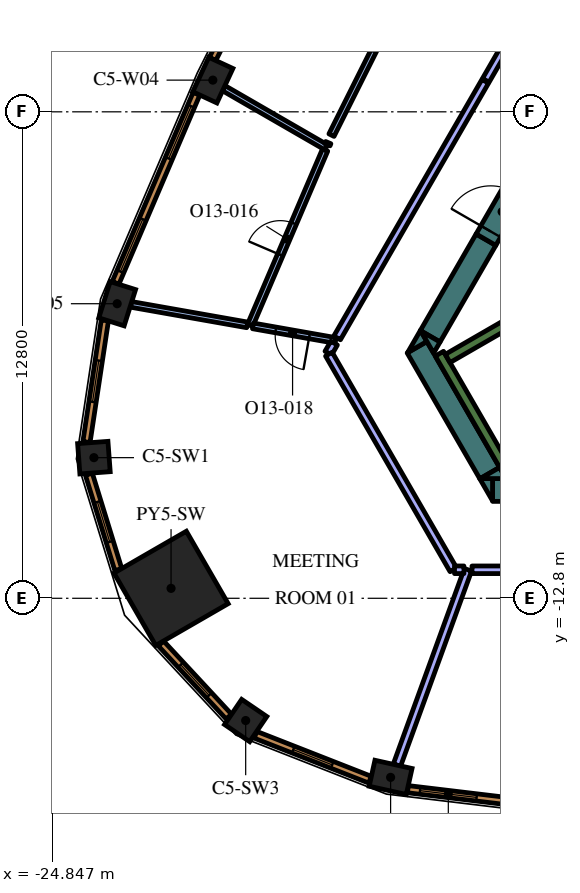
"""IFC4 building model, lengths in metres.
Left out: names, types, materials, properties, quantities, classifications, styles, units other than length and angle.
Written with IfcOpenShell. Run it as: python <this file> out.ifc"""

import sys

from ifc_helpers import new_model, si_unit, direction, frame, frame_2d, origin, origin_2d, place, context, subcontext, project, spatial, polyline, rectangle, outline, extrude, element, fill, save


model = new_model("IFC4")
c1 = context("Model", 3, precision=1e-05, world=origin(), true_north=direction((0.0, 1.0)))
c2 = subcontext(c1, "Body", "Model", "MODEL_VIEW")
j1 = project(units=[si_unit("LENGTHUNIT", "METRE"), si_unit("PLANEANGLEUNIT", "RADIAN")], contexts=[c1])
p1 = place(None, origin())
s1 = spatial("IfcSite", under=j1, at=p1, CompositionType="ELEMENT")
p2 = place(p1, origin())
s2 = spatial("IfcBuilding", under=s1, at=p2, CompositionType="ELEMENT")
p3 = place(p2, frame((0.0, 0.0, 296.4)))
s3 = spatial("IfcBuildingStorey", under=s2, at=p3, CompositionType="ELEMENT", Elevation=296.4)
p4 = place(p3, frame((-21.718, -12.539, 0.0), z_axis=(0.0, 0.0, 1.0), x_axis=(-0.866025403784, -0.5, 0.0)))
e1 = element("IfcColumn", 1, at=p4, inside=s3, PredefinedType="COLUMN", context=c2, shape_type="SweptSolid", body=[
    extrude(rectangle(XDim=2.2, YDim=2.2, at=origin_2d()), origin(), (0.0, 0.0, 1.0), 4.2),
])
for number, where, z_axis, x_axis in (
    (2, (-15.941, -17.512, 0.0), (0.0, 0.0, 1.0), (0.976, -0.217, 0.0)),
    (3, (-20.619, 0.834, 0.0), (0.0, 0.0, 1.0), (-0.421, -0.907, 0.0)),
    (4, (-23.136, -5.049, 0.0), (0.0, 0.0, 1.0), (-0.3, -0.954, 0.0)),
):
    element("IfcColumn", number, at=place(p3, frame(where, z_axis=z_axis, x_axis=x_axis)), inside=s3, PredefinedType="COLUMN", context=c2, shape_type="SweptSolid", body=[
        extrude(rectangle(XDim=1.0, YDim=0.7, at=origin_2d()), origin(), (0.0, 0.0, 1.0), 4.2),
    ])
for number, where, z_axis, x_axis in (
    (5, (-23.748, -9.1, 0.0), (0.0, 0.0, 1.0), (0.075, -0.997, 0.0)),
    (6, (-19.754, -16.017, 0.0), (0.0, 0.0, 1.0), (0.826, -0.563, 0.0)),
):
    element("IfcColumn", number, at=place(p3, frame(where, z_axis=z_axis, x_axis=x_axis)), inside=s3, PredefinedType="COLUMN", context=c2, shape_type="SweptSolid", body=[
        extrude(rectangle(XDim=0.8, YDim=0.8, at=origin_2d()), origin(), (0.0, 0.0, 1.0), 4.2),
    ])
p5 = place(p3, frame((8.904, -9.95, 0.0), z_axis=(0.0, 0.0, 1.0), x_axis=(-1.0, 0.0, 0.0)))
e7 = element("IfcWall", 7, at=p5, inside=s3, PredefinedType="SOLIDWALL", context=c2, shape_type="SweptSolid", body=[
    extrude(rectangle(XDim=22.161, YDim=0.6, at=frame_2d((11.081, 0.0))), origin(), (0.0, 0.0, 1.0), 4.2),
])
p6 = place(p3, origin())
e8 = element("IfcWall", 8, at=p6, inside=s3, PredefinedType="SOLIDWALL", context=c2, shape_type="SweptSolid", body=[
    extrude(outline(polyline([(-13.597, -9.65), (-13.259, -9.65), (-13.259, -10.236), (-13.597, -9.65)])), origin(), (0.0, 0.0, 1.0), 4.2),
])
p7 = place(p3, frame((-13.333, -9.506, 0.0), z_axis=(0.0, 0.0, 1.0), x_axis=(-0.500019073792, 0.866014391245, 0.0)))
e9 = element("IfcWall", 9, at=p7, inside=s3, PredefinedType="SOLIDWALL", context=c2, shape_type="SweptSolid", body=[
    extrude(rectangle(XDim=3.823, YDim=0.6, at=frame_2d((1.912, 0.0))), origin(), (0.0, 0.0, 1.0), 4.2),
])
e10 = element("IfcWall", 10, at=p6, inside=s3, PredefinedType="SOLIDWALL", context=c2, shape_type="SweptSolid", body=[
    extrude(outline(polyline([(-14.987, -6.043), (-15.493, -6.335), (-15.156, -5.75), (-14.987, -6.043)])), origin(), (0.0, 0.0, 1.0), 4.2),
])
e11 = element("IfcWall", 11, at=p6, inside=s3, PredefinedType="SOLIDWALL", context=c2, shape_type="SweptSolid", body=[
    extrude(outline(polyline([(-12.904, -9.65), (-13.58, -9.65), (-13.073, -9.357), (-12.904, -9.65)])), origin(), (0.0, 0.0, 1.0), 4.2),
])
p8 = place(p3, frame((-13.432, -3.364, 0.0), z_axis=(0.0, 0.0, 1.0), x_axis=(-0.499960127962, -0.866048422692, 0.0)))
e12 = element("IfcWall", 12, at=p8, inside=s3, PredefinedType="SOLIDWALL", context=c2, shape_type="SweptSolid", body=[
    extrude(rectangle(XDim=2.934, YDim=0.6, at=frame_2d((1.467, 0.0))), origin(), (0.0, 0.0, 1.0), 4.2),
])
e13 = element("IfcWall", 13, at=p6, inside=s3, PredefinedType="SOLIDWALL", context=c2, shape_type="SweptSolid", body=[
    extrude(outline(polyline([(-14.809, -6.35), (-15.147, -5.764), (-14.64, -6.057), (-14.809, -6.35)])), origin(), (0.0, 0.0, 1.0), 4.2),
])
p9 = place(p3, frame((-12.84, -9.511, 0.0), z_axis=(0.0, 0.0, 1.0), x_axis=(-0.499997733992, 0.866026712061, 0.0)))
e14 = element("IfcWall", 14, at=p9, inside=s3, PredefinedType="SOLIDWALL", context=c2, shape_type="SweptSolid", body=[
    extrude(rectangle(XDim=3.634, YDim=0.25, at=frame_2d((1.817, 0.0))), origin(), (0.0, 0.0, 1.0), 4.2),
])
p10 = place(p3, frame((-14.44, -6.49, 0.0), z_axis=(0.0, 0.0, 1.0), x_axis=(0.866022966069, 0.500004222222, 0.0)))
e15 = element("IfcWall", 15, at=p10, inside=s3, PredefinedType="SOLIDWALL", context=c2, shape_type="SweptSolid", body=[
    extrude(rectangle(XDim=6.8, YDim=0.25, at=frame_2d((3.4, 0.0))), origin(), (0.0, 0.0, 1.0), 4.2),
])
p11 = place(p3, frame((-13.432, -3.364, 0.0), z_axis=(0.0, 0.0, 1.0), x_axis=(0.500062241894, 0.865989465428, 0.0)))
e16 = element("IfcWall", 16, at=p11, inside=s3, PredefinedType="SOLIDWALL", context=c2, shape_type="SweptSolid", body=[
    extrude(rectangle(XDim=1.7, YDim=0.6, at=frame_2d((0.85, 0.0))), origin(), (0.0, 0.0, 1.0), 4.2),
])
p12 = place(p11, frame((0.25, 0.0, 0.0)))
e17 = element("IfcOpeningElement", 17, at=p12, cuts=e16, PredefinedType="OPENING", context=c2, shape_type="SweptSolid", body=[
    extrude(rectangle(XDim=1.2, YDim=2.1, at=frame_2d((0.6, 1.05))), frame((0.0, 0.31, 0.0), z_axis=(0.0, -1.0, 0.0), x_axis=(1.0, 0.0, 0.0)), (0.0, 0.0, 1.0), 0.62),
])
p13 = place(p3, frame((-15.774, -17.19, 0.0), z_axis=(0.0, 0.0, 1.0), x_axis=(0.341821907823, 0.93976474893, 0.0)))
e18 = element("IfcWall", 18, at=p13, inside=s3, PredefinedType="PARTITIONING", context=c2, shape_type="SweptSolid", body=[
    extrude(rectangle(XDim=5.469, YDim=0.2, at=frame_2d((2.735, 0.0))), origin(), (0.0, 0.0, 1.0), 3.55),
])
p14 = place(p3, frame((-13.799, -12.05, 0.0), z_axis=(0.0, 0.0, 1.0), x_axis=(1.0, 0.0, 0.0)))
e19 = element("IfcWall", 19, at=p14, inside=s3, PredefinedType="PARTITIONING", context=c2, shape_type="SweptSolid", body=[
    extrude(rectangle(XDim=7.769, YDim=0.2, at=frame_2d((3.884, 0.0))), origin(), (0.0, 0.0, 1.0), 3.55),
])
p15 = place(p14, frame((3.0, 0.0, 0.0)))
e20 = element("IfcOpeningElement", 20, at=p15, cuts=e19, PredefinedType="OPENING", context=c2, shape_type="SweptSolid", body=[
    extrude(rectangle(XDim=1.8, YDim=2.1, at=frame_2d((0.9, 1.05))), frame((0.0, 0.11, 0.0), z_axis=(0.0, -1.0, 0.0), x_axis=(1.0, 0.0, 0.0)), (0.0, 0.0, 1.0), 0.22),
])
p16 = place(p3, frame((-17.635, -0.936, 0.0), z_axis=(0.0, 0.0, 1.0), x_axis=(-0.866044607523, 0.499966736674, 0.0)))
e21 = element("IfcWall", 21, at=p16, inside=s3, PredefinedType="PARTITIONING", context=c2, shape_type="SweptSolid", body=[
    extrude(rectangle(XDim=3.115, YDim=0.15, at=frame_2d((1.557, 0.0))), origin(), (0.0, 0.0, 1.0), 3.55),
])
p17 = place(p3, frame((-17.497, -0.613, 0.0), z_axis=(0.0, 0.0, 1.0), x_axis=(0.447480081559, 0.89429389834, 0.0)))
e22 = element("IfcWall", 22, at=p17, inside=s3, PredefinedType="PARTITIONING", context=c2, shape_type="SweptSolid", body=[
    extrude(rectangle(XDim=5.863, YDim=0.15, at=frame_2d((2.931, 0.0))), origin(), (0.0, 0.0, 1.0), 3.55),
])
p18 = place(p17, frame((2.463, 0.0, 0.0)))
e23 = element("IfcOpeningElement", 23, at=p18, cuts=e22, PredefinedType="OPENING", context=c2, shape_type="SweptSolid", body=[
    extrude(rectangle(XDim=0.9, YDim=2.1, at=frame_2d((0.45, 1.05))), frame((0.0, 0.085, 0.0), z_axis=(0.0, -1.0, 0.0), x_axis=(1.0, 0.0, 0.0)), (0.0, 0.0, 1.0), 0.17),
])
p19 = place(p3, frame((-17.581, -0.81, 0.0), z_axis=(0.0, 0.0, 1.0), x_axis=(-0.390033474923, -0.92080067791, 0.0)))
e24 = element("IfcWall", 24, at=p19, inside=s3, PredefinedType="PARTITIONING", context=c2, shape_type="SweptSolid", body=[
    extrude(rectangle(XDim=0.061, YDim=0.15, at=frame_2d((0.03, 0.0))), origin(), (0.0, 0.0, 1.0), 3.55),
])
p20 = place(p3, frame((-19.639, -5.62, 0.0), z_axis=(0.0, 0.0, 1.0), x_axis=(0.393349802257, 0.919388891092, 0.0)))
e25 = element("IfcWall", 25, at=p20, inside=s3, PredefinedType="PARTITIONING", context=c2, shape_type="SweptSolid", body=[
    extrude(rectangle(XDim=5.019, YDim=0.15, at=frame_2d((2.51, 0.0))), origin(), (0.0, 0.0, 1.0), 3.55),
])
p21 = place(p20, frame((2.019, 0.0, 0.0)))
e26 = element("IfcOpeningElement", 26, at=p21, cuts=e25, PredefinedType="OPENING", context=c2, shape_type="SweptSolid", body=[
    extrude(rectangle(XDim=0.9, YDim=2.1, at=frame_2d((0.45, 1.05))), frame((0.0, 0.085, 0.0), z_axis=(0.0, -1.0, 0.0), x_axis=(1.0, 0.0, 0.0)), (0.0, 0.0, 1.0), 0.17),
])
p22 = place(p3, frame((-19.714, -5.606, 0.0), z_axis=(0.0, 0.0, 1.0), x_axis=(-0.984768527071, 0.173870492294, 0.0)))
e27 = element("IfcWall", 27, at=p22, inside=s3, PredefinedType="PARTITIONING", context=c2, shape_type="SweptSolid", body=[
    extrude(rectangle(XDim=3.107, YDim=0.15, at=frame_2d((1.554, 0.0))), origin(), (0.0, 0.0, 1.0), 3.55),
])
p23 = place(p3, frame((-17.388, -6.017, 0.0), z_axis=(0.0, 0.0, 1.0), x_axis=(-0.984764633635, 0.173892542513, 0.0)))
e28 = element("IfcWall", 28, at=p23, inside=s3, PredefinedType="PARTITIONING", context=c2, shape_type="SweptSolid", body=[
    extrude(rectangle(XDim=2.208, YDim=0.15, at=frame_2d((1.104, 0.0))), origin(), (0.0, 0.0, 1.0), 3.55),
])
p24 = place(p23, frame((0.7, 0.0, 0.0)))
e29 = element("IfcOpeningElement", 29, at=p24, cuts=e28, PredefinedType="OPENING", context=c2, shape_type="SweptSolid", body=[
    extrude(rectangle(XDim=0.9, YDim=2.1, at=frame_2d((0.45, 1.05))), frame((0.0, 0.085, 0.0), z_axis=(0.0, -1.0, 0.0), x_axis=(1.0, 0.0, 0.0)), (0.0, 0.0, 1.0), 0.17),
])
p25 = place(p3, frame((-7.436, 11.221, 0.0), z_axis=(0.0, 0.0, 1.0), x_axis=(-0.49999894854, -0.866026010844, 0.0)))
e30 = element("IfcWall", 30, at=p25, inside=s3, PredefinedType="PARTITIONING", context=c2, shape_type="SweptSolid", body=[
    extrude(rectangle(XDim=12.0, YDim=0.2, at=frame_2d((6.0, 0.0))), origin(), (0.0, 0.0, 1.0), 3.55),
])
p26 = place(p25, frame((5.5, 0.0, 0.0)))
e31 = element("IfcOpeningElement", 31, at=p26, cuts=e30, PredefinedType="OPENING", context=c2, shape_type="SweptSolid", body=[
    extrude(rectangle(XDim=1.0, YDim=2.1, at=frame_2d((0.5, 1.05))), frame((0.0, 0.11, 0.0), z_axis=(0.0, -1.0, 0.0), x_axis=(1.0, 0.0, 0.0)), (0.0, 0.0, 1.0), 0.22),
])
p27 = place(p3, frame((-13.451, 0.803, 0.0), z_axis=(0.0, 0.0, 1.0), x_axis=(-0.499979102685, -0.866037468519, 0.0)))
e32 = element("IfcWall", 32, at=p27, inside=s3, PredefinedType="PARTITIONING", context=c2, shape_type="SweptSolid", body=[
    extrude(rectangle(XDim=7.795, YDim=0.2, at=frame_2d((3.897, 0.0))), origin(), (0.0, 0.0, 1.0), 3.55),
])
p28 = place(p3, frame((-17.428, -6.086, 0.0), z_axis=(0.0, 0.0, 1.0), x_axis=(-0.499930512259, -0.866065518833, 0.0)))
e33 = element("IfcWall", 33, at=p28, inside=s3, PredefinedType="PARTITIONING", context=c2, shape_type="SweptSolid", body=[
    extrude(rectangle(XDim=0.305, YDim=0.2, at=frame_2d((0.152, 0.0))), origin(), (0.0, 0.0, 1.0), 3.55),
])
p29 = place(p3, frame((-17.565, -6.376, 0.0), z_axis=(0.0, 0.0, 1.0), x_axis=(0.499994477444, -0.86602859221, 0.0)))
e34 = element("IfcWall", 34, at=p29, inside=s3, PredefinedType="PARTITIONING", context=c2, shape_type="SweptSolid", body=[
    extrude(rectangle(XDim=6.552, YDim=0.2, at=frame_2d((3.276, 0.0))), origin(), (0.0, 0.0, 1.0), 3.55),
])
p30 = place(p3, frame((-14.26, -12.05, 0.0), z_axis=(0.0, 0.0, 1.0), x_axis=(1.0, 0.0, 0.0)))
e35 = element("IfcWall", 35, at=p30, inside=s3, PredefinedType="PARTITIONING", context=c2, shape_type="SweptSolid", body=[
    extrude(rectangle(XDim=0.248, YDim=0.2, at=frame_2d((0.124, 0.0))), origin(), (0.0, 0.0, 1.0), 3.55),
])
p31 = place(p3, frame((-15.487, -17.823, 0.0), z_axis=(0.0, 0.0, 1.0), x_axis=(0.992885582795, -0.119072328769, 0.0)))
e36 = element("IfcWall", 36, at=p31, inside=s3, PredefinedType="SOLIDWALL", context=c2, shape_type="SweptSolid", body=[
    extrude(rectangle(XDim=5.415, YDim=0.19, at=frame_2d((2.708, 0.0))), origin(), (0.0, 0.0, 1.0), 3.95),
])
p32 = place(p31, frame((0.323, 0.0, 0.6)))
e37 = element("IfcOpeningElement", 37, at=p32, cuts=e36, PredefinedType="OPENING", context=c2, shape_type="SweptSolid", body=[
    extrude(rectangle(XDim=1.5, YDim=2.85, at=frame_2d((0.75, 1.425))), frame((0.0, 0.105, 0.0), z_axis=(0.0, -1.0, 0.0), x_axis=(1.0, 0.0, 0.0)), (0.0, 0.0, 1.0), 0.21),
])
p33 = place(p31, frame((3.558, 0.0, 0.6)))
e38 = element("IfcOpeningElement", 38, at=p33, cuts=e36, PredefinedType="OPENING", context=c2, shape_type="SweptSolid", body=[
    extrude(rectangle(XDim=1.5, YDim=2.85, at=frame_2d((0.75, 1.425))), frame((0.0, 0.105, 0.0), z_axis=(0.0, -1.0, 0.0), x_axis=(1.0, 0.0, 0.0)), (0.0, 0.0, 1.0), 0.21),
])
p34 = place(p3, frame((-18.206, 6.227, 0.0), z_axis=(0.0, 0.0, 1.0), x_axis=(-0.447484531401, -0.894291671747, 0.0)))
e39 = element("IfcWall", 39, at=p34, inside=s3, PredefinedType="SOLIDWALL", context=c2, shape_type="SweptSolid", body=[
    extrude(rectangle(XDim=5.406, YDim=0.19, at=frame_2d((2.703, 0.0))), origin(), (0.0, 0.0, 1.0), 3.95),
])
p35 = place(p34, frame((0.346, 0.0, 0.6)))
e40 = element("IfcOpeningElement", 40, at=p35, cuts=e39, PredefinedType="OPENING", context=c2, shape_type="SweptSolid", body=[
    extrude(rectangle(XDim=1.5, YDim=2.85, at=frame_2d((0.75, 1.425))), frame((0.0, 0.105, 0.0), z_axis=(0.0, -1.0, 0.0), x_axis=(1.0, 0.0, 0.0)), (0.0, 0.0, 1.0), 0.21),
])
p36 = place(p34, frame((3.559, 0.0, 0.6)))
e41 = element("IfcOpeningElement", 41, at=p36, cuts=e39, PredefinedType="OPENING", context=c2, shape_type="SweptSolid", body=[
    extrude(rectangle(XDim=1.5, YDim=2.85, at=frame_2d((0.75, 1.425))), frame((0.0, 0.105, 0.0), z_axis=(0.0, -1.0, 0.0), x_axis=(1.0, 0.0, 0.0)), (0.0, 0.0, 1.0), 0.21),
])
p37 = place(p3, frame((-21.049, 0.478, 0.0), z_axis=(0.0, 0.0, 1.0), x_axis=(-0.393347848476, -0.919389726992, 0.0)))
e42 = element("IfcWall", 42, at=p37, inside=s3, PredefinedType="SOLIDWALL", context=c2, shape_type="SweptSolid", body=[
    extrude(rectangle(XDim=5.415, YDim=0.19, at=frame_2d((2.708, 0.0))), origin(), (0.0, 0.0, 1.0), 3.95),
])
p38 = place(p37, frame((0.357, 0.0, 0.6)))
e43 = element("IfcOpeningElement", 43, at=p38, cuts=e42, PredefinedType="OPENING", context=c2, shape_type="SweptSolid", body=[
    extrude(rectangle(XDim=1.5, YDim=2.85, at=frame_2d((0.75, 1.425))), frame((0.0, 0.105, 0.0), z_axis=(0.0, -1.0, 0.0), x_axis=(1.0, 0.0, 0.0)), (0.0, 0.0, 1.0), 0.21),
])
p39 = place(p37, frame((3.593, 0.0, 0.6)))
e44 = element("IfcOpeningElement", 44, at=p39, cuts=e42, PredefinedType="OPENING", context=c2, shape_type="SweptSolid", body=[
    extrude(rectangle(XDim=1.5, YDim=2.85, at=frame_2d((0.75, 1.425))), frame((0.0, 0.105, 0.0), z_axis=(0.0, -1.0, 0.0), x_axis=(1.0, 0.0, 0.0)), (0.0, 0.0, 1.0), 0.21),
])
p40 = place(p3, frame((-23.46, -5.488, 0.0), z_axis=(0.0, 0.0, 1.0), x_axis=(-0.149421055602, -0.988773658702, 0.0)))
e45 = element("IfcWall", 45, at=p40, inside=s3, PredefinedType="SOLIDWALL", context=c2, shape_type="SweptSolid", body=[
    extrude(rectangle(XDim=3.237, YDim=0.19, at=frame_2d((1.618, 0.0))), origin(), (0.0, 0.0, 1.0), 3.95),
])
p41 = place(p40, frame((1.068, 0.0, 0.6)))
e46 = element("IfcOpeningElement", 46, at=p41, cuts=e45, PredefinedType="OPENING", context=c2, shape_type="SweptSolid", body=[
    extrude(rectangle(XDim=1.1, YDim=2.85, at=frame_2d((0.55, 1.425))), frame((0.0, 0.105, 0.0), z_axis=(0.0, -1.0, 0.0), x_axis=(1.0, 0.0, 0.0)), (0.0, 0.0, 1.0), 0.21),
])
p42 = place(p3, frame((-23.881, -9.535, 0.0), z_axis=(0.0, 0.0, 1.0), x_axis=(0.294706210429, -0.9555879078, 0.0)))
e47 = element("IfcWall", 47, at=p42, inside=s3, PredefinedType="SOLIDWALL", context=c2, shape_type="SweptSolid", body=[
    extrude(rectangle(XDim=2.627, YDim=0.19, at=frame_2d((1.313, 0.0))), origin(), (0.0, 0.0, 1.0), 3.95),
])
p43 = place(p42, frame((0.763, 0.0, 0.6)))
e48 = element("IfcOpeningElement", 48, at=p43, cuts=e47, PredefinedType="OPENING", context=c2, shape_type="SweptSolid", body=[
    extrude(rectangle(XDim=1.1, YDim=2.85, at=frame_2d((0.55, 1.425))), frame((0.0, 0.105, 0.0), z_axis=(0.0, -1.0, 0.0), x_axis=(1.0, 0.0, 0.0)), (0.0, 0.0, 1.0), 0.21),
])
p44 = place(p3, frame((-21.985, -13.988, 0.0), z_axis=(0.0, 0.0, 1.0), x_axis=(0.680219354823, -0.733008614768, 0.0)))
e49 = element("IfcWall", 49, at=p44, inside=s3, PredefinedType="SOLIDWALL", context=c2, shape_type="SweptSolid", body=[
    extrude(rectangle(XDim=2.627, YDim=0.19, at=frame_2d((1.313, 0.0))), origin(), (0.0, 0.0, 1.0), 3.95),
])
p45 = place(p44, frame((0.763, 0.0, 0.6)))
e50 = element("IfcOpeningElement", 50, at=p45, cuts=e49, PredefinedType="OPENING", context=c2, shape_type="SweptSolid", body=[
    extrude(rectangle(XDim=1.1, YDim=2.85, at=frame_2d((0.55, 1.425))), frame((0.0, 0.105, 0.0), z_axis=(0.0, -1.0, 0.0), x_axis=(1.0, 0.0, 0.0)), (0.0, 0.0, 1.0), 0.21),
])
p46 = place(p3, frame((-19.496, -16.392, 0.0), z_axis=(0.0, 0.0, 1.0), x_axis=(0.93100888477, -0.364996515709, 0.0)))
e51 = element("IfcWall", 51, at=p46, inside=s3, PredefinedType="SOLIDWALL", context=c2, shape_type="SweptSolid", body=[
    extrude(rectangle(XDim=3.237, YDim=0.19, at=frame_2d((1.618, 0.0))), origin(), (0.0, 0.0, 1.0), 3.95),
])
p47 = place(p46, frame((1.068, 0.0, 0.6)))
e52 = element("IfcOpeningElement", 52, at=p47, cuts=e51, PredefinedType="OPENING", context=c2, shape_type="SweptSolid", body=[
    extrude(rectangle(XDim=1.1, YDim=2.85, at=frame_2d((0.55, 1.425))), frame((0.0, 0.105, 0.0), z_axis=(0.0, -1.0, 0.0), x_axis=(1.0, 0.0, 0.0)), (0.0, 0.0, 1.0), 0.21),
])
p48 = place(p12, origin())
e53 = element("IfcDoor", 53, at=p48, inside=s3, OperationType="SINGLE_SWING_LEFT", PredefinedType="DOOR", context=c2, shape_type="SweptSolid", body=[
    extrude(rectangle(XDim=1.2, YDim=2.1, at=frame_2d((0.6, 1.05))), frame((0.0, 0.025, 0.0), z_axis=(0.0, -1.0, 0.0), x_axis=(1.0, 0.0, 0.0)), (0.0, 0.0, 1.0), 0.05),
])
fill(e17, e53)
p49 = place(p21, origin())
e54 = element("IfcDoor", 54, at=p49, inside=s3, OperationType="SINGLE_SWING_LEFT", PredefinedType="DOOR", context=c2, shape_type="SweptSolid", body=[
    extrude(rectangle(XDim=0.9, YDim=2.1, at=frame_2d((0.45, 1.05))), frame((0.0, 0.025, 0.0), z_axis=(0.0, -1.0, 0.0), x_axis=(1.0, 0.0, 0.0)), (0.0, 0.0, 1.0), 0.05),
])
fill(e26, e54)
p50 = place(p24, origin())
e55 = element("IfcDoor", 55, at=p50, inside=s3, OperationType="SINGLE_SWING_RIGHT", PredefinedType="DOOR", context=c2, shape_type="SweptSolid", body=[
    extrude(rectangle(XDim=0.9, YDim=2.1, at=frame_2d((0.45, 1.05))), frame((0.0, 0.025, 0.0), z_axis=(0.0, -1.0, 0.0), x_axis=(1.0, 0.0, 0.0)), (0.0, 0.0, 1.0), 0.05),
])
fill(e29, e55)
p51 = place(p32, origin())
e56 = element("IfcWindow", 56, at=p51, inside=s3, PartitioningType="SINGLE_PANEL", PredefinedType="WINDOW", context=c2, shape_type="SweptSolid", body=[
    extrude(rectangle(XDim=1.5, YDim=2.85, at=frame_2d((0.75, 1.425))), frame((0.0, 0.045, 0.0), z_axis=(0.0, -1.0, 0.0), x_axis=(1.0, 0.0, 0.0)), (0.0, 0.0, 1.0), 0.06),
])
fill(e37, e56)
p52 = place(p38, origin())
e57 = element("IfcWindow", 57, at=p52, inside=s3, PartitioningType="SINGLE_PANEL", PredefinedType="WINDOW", context=c2, shape_type="SweptSolid", body=[
    extrude(rectangle(XDim=1.5, YDim=2.85, at=frame_2d((0.75, 1.425))), frame((0.0, 0.045, 0.0), z_axis=(0.0, -1.0, 0.0), x_axis=(1.0, 0.0, 0.0)), (0.0, 0.0, 1.0), 0.06),
])
fill(e43, e57)
p53 = place(p39, origin())
e58 = element("IfcWindow", 58, at=p53, inside=s3, PartitioningType="SINGLE_PANEL", PredefinedType="WINDOW", context=c2, shape_type="SweptSolid", body=[
    extrude(rectangle(XDim=1.5, YDim=2.85, at=frame_2d((0.75, 1.425))), frame((0.0, 0.045, 0.0), z_axis=(0.0, -1.0, 0.0), x_axis=(1.0, 0.0, 0.0)), (0.0, 0.0, 1.0), 0.06),
])
fill(e44, e58)
p54 = place(p41, origin())
e59 = element("IfcWindow", 59, at=p54, inside=s3, PartitioningType="SINGLE_PANEL", PredefinedType="WINDOW", context=c2, shape_type="SweptSolid", body=[
    extrude(rectangle(XDim=1.1, YDim=2.85, at=frame_2d((0.55, 1.425))), frame((0.0, 0.045, 0.0), z_axis=(0.0, -1.0, 0.0), x_axis=(1.0, 0.0, 0.0)), (0.0, 0.0, 1.0), 0.06),
])
fill(e46, e59)
p55 = place(p43, origin())
e60 = element("IfcWindow", 60, at=p55, inside=s3, PartitioningType="SINGLE_PANEL", PredefinedType="WINDOW", context=c2, shape_type="SweptSolid", body=[
    extrude(rectangle(XDim=1.1, YDim=2.85, at=frame_2d((0.55, 1.425))), frame((0.0, 0.045, 0.0), z_axis=(0.0, -1.0, 0.0), x_axis=(1.0, 0.0, 0.0)), (0.0, 0.0, 1.0), 0.06),
])
fill(e48, e60)
p56 = place(p45, origin())
e61 = element("IfcWindow", 61, at=p56, inside=s3, PartitioningType="SINGLE_PANEL", PredefinedType="WINDOW", context=c2, shape_type="SweptSolid", body=[
    extrude(rectangle(XDim=1.1, YDim=2.85, at=frame_2d((0.55, 1.425))), frame((0.0, 0.045, 0.0), z_axis=(0.0, -1.0, 0.0), x_axis=(1.0, 0.0, 0.0)), (0.0, 0.0, 1.0), 0.06),
])
fill(e50, e61)
p57 = place(p47, origin())
e62 = element("IfcWindow", 62, at=p57, inside=s3, PartitioningType="SINGLE_PANEL", PredefinedType="WINDOW", context=c2, shape_type="SweptSolid", body=[
    extrude(rectangle(XDim=1.1, YDim=2.85, at=frame_2d((0.55, 1.425))), frame((0.0, 0.045, 0.0), z_axis=(0.0, -1.0, 0.0), x_axis=(1.0, 0.0, 0.0)), (0.0, 0.0, 1.0), 0.06),
])
fill(e52, e62)
save(model, sys.argv[1])
